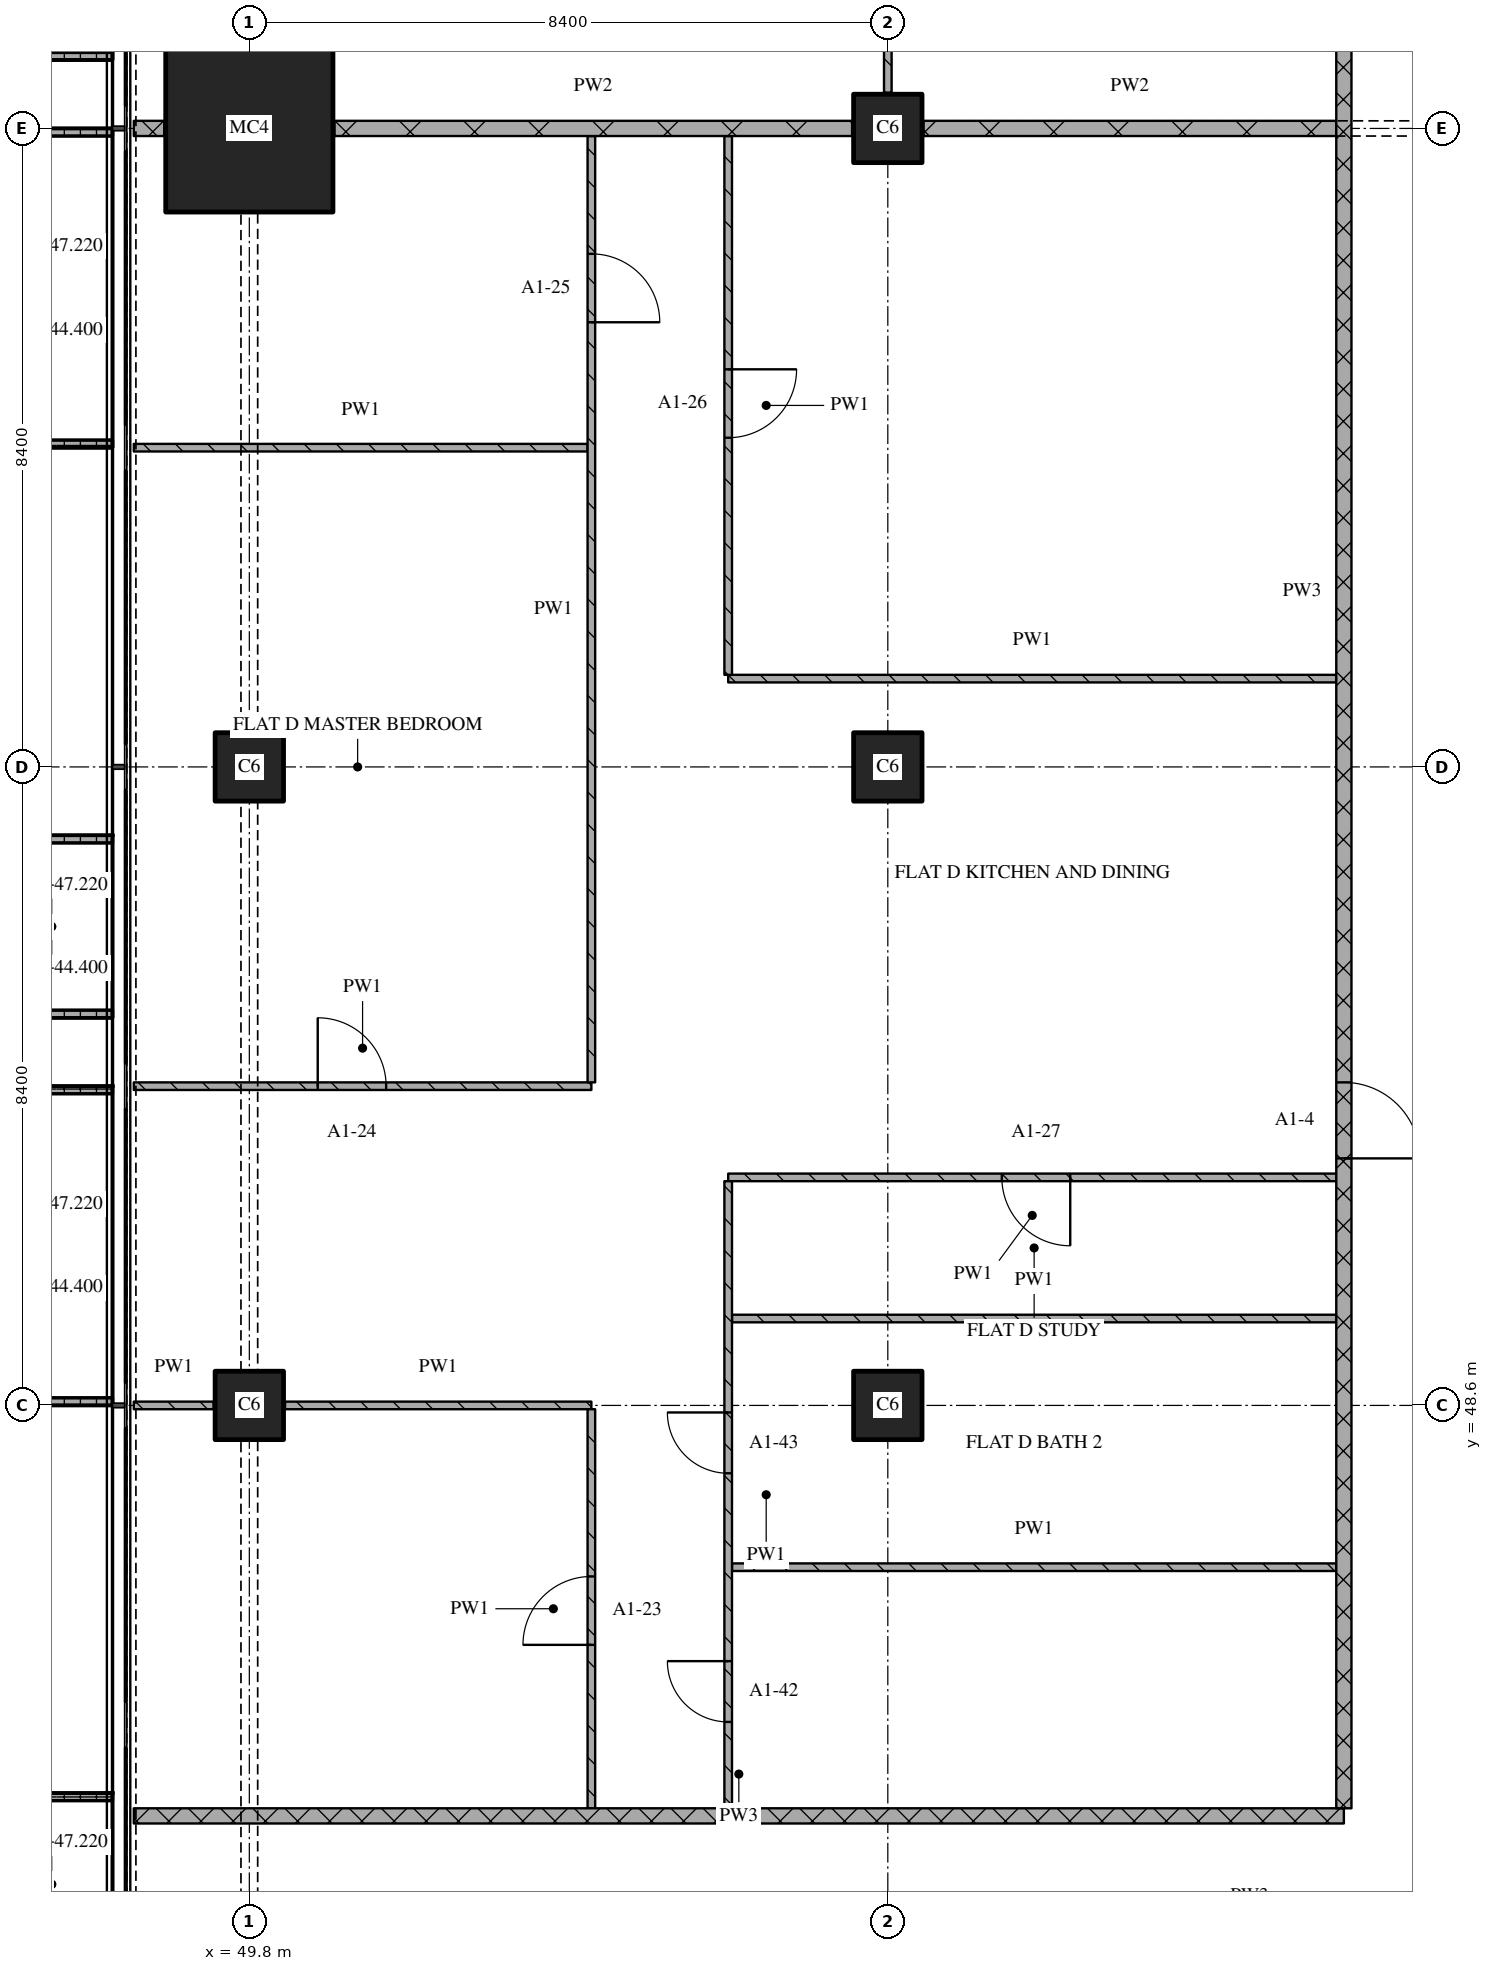
"""IFC4 building model, lengths in metres.
Left out: names, types, materials, properties, quantities, classifications, styles, units other than length and angle.
Written with IfcOpenShell. Run it as: python <this file> out.ifc"""

import sys

from ifc_helpers import new_model, si_unit, direction, frame, frame_2d, origin, origin_2d, place, context, subcontext, project, spatial, polyline, rectangle, outline, extrude, element, fill, save


model = new_model("IFC4")
c1 = context("Model", 3, precision=1e-05, world=origin(), true_north=direction((0.0, 1.0)))
c2 = subcontext(c1, "Body", "Model", "MODEL_VIEW")
j1 = project(units=[si_unit("LENGTHUNIT", "METRE"), si_unit("PLANEANGLEUNIT", "RADIAN")], contexts=[c1])
p1 = place(None, origin())
s1 = spatial("IfcSite", under=j1, at=p1, CompositionType="ELEMENT")
p2 = place(p1, origin())
s2 = spatial("IfcBuilding", under=s1, at=p2, CompositionType="ELEMENT")
p3 = place(p2, frame((0.0, 0.0, 44.4)))
s3 = spatial("IfcBuildingStorey", under=s2, at=p3, CompositionType="ELEMENT", Elevation=44.4)
for number, where, z_axis, x_axis in (
    (1, (49.8, 48.6, 0.0), (0.0, 0.0, 1.0), (1.0, 0.0, 0.0)),
    (2, (49.8, 57.0, 0.0), (0.0, 0.0, 1.0), (1.0, 0.0, 0.0)),
):
    element("IfcColumn", number, at=place(p3, frame(where, z_axis=z_axis, x_axis=x_axis)), inside=s3, PredefinedType="COLUMN", context=c2, shape_type="SweptSolid", body=[
        extrude(rectangle(XDim=0.9, YDim=0.9, at=origin_2d()), origin(), (0.0, 0.0, 1.0), 3.6),
    ])
p4 = place(p3, frame((49.8, 65.4, 0.0), z_axis=(0.0, 0.0, 1.0), x_axis=(1.0, 0.0, 0.0)))
e3 = element("IfcColumn", 3, at=p4, inside=s3, PredefinedType="COLUMN", context=c2, shape_type="SweptSolid", body=[
    extrude(rectangle(XDim=2.2, YDim=2.2, at=origin_2d()), origin(), (0.0, 0.0, 1.0), 3.6),
])
for number, where, z_axis, x_axis in (
    (4, (58.2, 48.6, 0.0), (0.0, 0.0, 1.0), (1.0, 0.0, 0.0)),
    (5, (58.2, 57.0, 0.0), (0.0, 0.0, 1.0), (1.0, 0.0, 0.0)),
    (6, (58.2, 65.4, 0.0), (0.0, 0.0, 1.0), (1.0, 0.0, 0.0)),
):
    element("IfcColumn", number, at=place(p3, frame(where, z_axis=z_axis, x_axis=x_axis)), inside=s3, PredefinedType="COLUMN", context=c2, shape_type="SweptSolid", body=[
        extrude(rectangle(XDim=0.9, YDim=0.9, at=origin_2d()), origin(), (0.0, 0.0, 1.0), 3.6),
    ])
p5 = place(p3, origin())
e7 = element("IfcWall", 7, at=p5, inside=s3, PredefinedType="SOLIDWALL", context=c2, shape_type="SweptSolid", body=[
    extrude(outline(polyline([(48.0, 68.7), (48.0, 68.6), (46.5, 68.6), (46.5, 66.4), (48.0, 66.4), (48.0, 66.3), (46.4, 66.3), (46.4, 68.7), (48.0, 68.7)])), origin(), (0.0, 0.0, 1.0), 1.0),
])
p6 = place(p3, origin())
e8 = element("IfcWall", 8, at=p6, inside=s3, PredefinedType="SOLIDWALL", context=c2, shape_type="SweptSolid", body=[
    extrude(outline(polyline([(48.0, 65.4), (48.0, 65.3), (46.367, 65.3), (46.367, 61.3), (48.0, 61.3), (48.0, 61.2), (46.267, 61.2), (46.267, 65.4), (48.0, 65.4)])), origin(), (0.0, 0.0, 1.0), 1.0),
])
p7 = place(p3, origin())
e9 = element("IfcWall", 9, at=p7, inside=s3, PredefinedType="SOLIDWALL", context=c2, shape_type="SweptSolid", body=[
    extrude(outline(polyline([(48.0, 56.1), (48.0, 56.0), (46.5, 56.0), (46.5, 53.8), (48.0, 53.8), (48.0, 53.7), (46.4, 53.7), (46.4, 56.1), (48.0, 56.1)])), origin(), (0.0, 0.0, 1.0), 1.0),
])
p8 = place(p3, origin())
e10 = element("IfcWall", 10, at=p8, inside=s3, PredefinedType="SOLIDWALL", context=c2, shape_type="SweptSolid", body=[
    extrude(outline(polyline([(48.0, 52.8), (48.0, 52.7), (46.367, 52.7), (46.367, 48.7), (48.0, 48.7), (48.0, 48.6), (46.267, 48.6), (46.267, 52.8), (48.0, 52.8)])), origin(), (0.0, 0.0, 1.0), 1.0),
])
p9 = place(p3, origin())
e11 = element("IfcWall", 11, at=p9, inside=s3, PredefinedType="SOLIDWALL", context=c2, shape_type="SweptSolid", body=[
    extrude(outline(polyline([(48.0, 43.5), (48.0, 43.4), (46.5, 43.4), (46.5, 41.2), (48.0, 41.2), (48.0, 41.1), (46.4, 41.1), (46.4, 43.5), (48.0, 43.5)])), origin(), (0.0, 0.0, 1.0), 1.0),
])
p10 = place(p3, frame((48.28, 43.2, 0.0), z_axis=(0.0, 0.0, 1.0), x_axis=(1.0, 0.0, 0.0)))
e12 = element("IfcWall", 12, at=p10, inside=s3, PredefinedType="PARTITIONING", context=c2, shape_type="SweptSolid", body=[
    extrude(rectangle(XDim=15.92, YDim=0.2, at=frame_2d((7.96, 0.0))), origin(), (0.0, 0.0, 1.0), 3.32),
])
p11 = place(p3, frame((56.15, 46.472, 0.0), z_axis=(0.0, 0.0, 1.0), x_axis=(1.0, 0.0, 0.0)))
e13 = element("IfcWall", 13, at=p11, inside=s3, PredefinedType="PARTITIONING", context=c2, shape_type="SweptSolid", body=[
    extrude(rectangle(XDim=7.95, YDim=0.1, at=frame_2d((3.975, 0.0))), origin(), (0.0, 0.0, 1.0), 3.32),
])
p12 = place(p3, frame((48.28, 48.6, 0.0), z_axis=(0.0, 0.0, 1.0), x_axis=(1.0, 0.0, 0.0)))
e14 = element("IfcWall", 14, at=p12, inside=s3, PredefinedType="PARTITIONING", context=c2, shape_type="SweptSolid", body=[
    extrude(rectangle(XDim=1.05, YDim=0.1, at=frame_2d((0.525, 0.0))), origin(), (0.0, 0.0, 1.0), 3.32),
])
p13 = place(p3, frame((50.27, 48.6, 0.0), z_axis=(0.0, 0.0, 1.0), x_axis=(1.0, 0.0, 0.0)))
e15 = element("IfcWall", 15, at=p13, inside=s3, PredefinedType="PARTITIONING", context=c2, shape_type="SweptSolid", body=[
    extrude(rectangle(XDim=4.03, YDim=0.1, at=frame_2d((2.015, 0.0))), origin(), (0.0, 0.0, 1.0), 3.32),
])
p14 = place(p3, frame((56.15, 49.743, 0.0), z_axis=(0.0, 0.0, 1.0), x_axis=(1.0, 0.0, 0.0)))
e16 = element("IfcWall", 16, at=p14, inside=s3, PredefinedType="PARTITIONING", context=c2, shape_type="SweptSolid", body=[
    extrude(rectangle(XDim=7.95, YDim=0.1, at=frame_2d((3.975, 0.0))), origin(), (0.0, 0.0, 1.0), 3.32),
])
p15 = place(p3, frame((64.1, 51.6, 0.0), z_axis=(0.0, 0.0, 1.0), x_axis=(-1.0, 0.0, 0.0)))
e17 = element("IfcWall", 17, at=p15, inside=s3, PredefinedType="PARTITIONING", context=c2, shape_type="SweptSolid", body=[
    extrude(rectangle(XDim=8.0, YDim=0.1, at=frame_2d((4.0, 0.0))), origin(), (0.0, 0.0, 1.0), 3.32),
])
p16 = place(p15, frame((3.5, 0.0, 0.0)))
e18 = element("IfcOpeningElement", 18, at=p16, cuts=e17, PredefinedType="OPENING", context=c2, shape_type="SweptSolid", body=[
    extrude(rectangle(XDim=0.9, YDim=2.1, at=frame_2d((0.45, 1.05))), frame((0.0, 0.06, 0.0), z_axis=(0.0, -1.0, 0.0), x_axis=(1.0, 0.0, 0.0)), (0.0, 0.0, 1.0), 0.12),
])
p17 = place(p3, frame((48.28, 52.8, 0.0), z_axis=(0.0, 0.0, 1.0), x_axis=(1.0, 0.0, 0.0)))
e19 = element("IfcWall", 19, at=p17, inside=s3, PredefinedType="PARTITIONING", context=c2, shape_type="SweptSolid", body=[
    extrude(rectangle(XDim=6.02, YDim=0.1, at=frame_2d((3.01, 0.0))), origin(), (0.0, 0.0, 1.0), 3.32),
])
p18 = place(p17, frame((2.42, 0.0, 0.0)))
e20 = element("IfcOpeningElement", 20, at=p18, cuts=e19, PredefinedType="OPENING", context=c2, shape_type="SweptSolid", body=[
    extrude(rectangle(XDim=0.9, YDim=2.1, at=frame_2d((0.45, 1.05))), frame((0.0, 0.06, 0.0), z_axis=(0.0, -1.0, 0.0), x_axis=(1.0, 0.0, 0.0)), (0.0, 0.0, 1.0), 0.12),
])
p19 = place(p3, frame((56.1, 58.162, 0.0), z_axis=(0.0, 0.0, 1.0), x_axis=(1.0, 0.0, 0.0)))
e21 = element("IfcWall", 21, at=p19, inside=s3, PredefinedType="PARTITIONING", context=c2, shape_type="SweptSolid", body=[
    extrude(rectangle(XDim=8.0, YDim=0.1, at=frame_2d((4.0, 0.0))), origin(), (0.0, 0.0, 1.0), 3.32),
])
p20 = place(p3, frame((48.28, 61.2, 0.0), z_axis=(0.0, 0.0, 1.0), x_axis=(1.0, 0.0, 0.0)))
e22 = element("IfcWall", 22, at=p20, inside=s3, PredefinedType="PARTITIONING", context=c2, shape_type="SweptSolid", body=[
    extrude(rectangle(XDim=5.97, YDim=0.1, at=frame_2d((2.985, 0.0))), origin(), (0.0, 0.0, 1.0), 3.32),
])
p21 = place(p3, frame((48.28, 65.4, 0.0), z_axis=(0.0, 0.0, 1.0), x_axis=(1.0, 0.0, 0.0)))
e23 = element("IfcWall", 23, at=p21, inside=s3, PredefinedType="PARTITIONING", context=c2, shape_type="SweptSolid", body=[
    extrude(rectangle(XDim=0.4, YDim=0.2, at=frame_2d((0.2, 0.0))), origin(), (0.0, 0.0, 1.0), 3.32),
])
p22 = place(p3, frame((50.92, 65.4, 0.0), z_axis=(0.0, 0.0, 1.0), x_axis=(1.0, 0.0, 0.0)))
e24 = element("IfcWall", 24, at=p22, inside=s3, PredefinedType="PARTITIONING", context=c2, shape_type="SweptSolid", body=[
    extrude(rectangle(XDim=6.81, YDim=0.2, at=frame_2d((3.405, 0.0))), origin(), (0.0, 0.0, 1.0), 3.32),
])
p23 = place(p3, frame((58.67, 65.4, 0.0), z_axis=(0.0, 0.0, 1.0), x_axis=(1.0, 0.0, 0.0)))
e25 = element("IfcWall", 25, at=p23, inside=s3, PredefinedType="PARTITIONING", context=c2, shape_type="SweptSolid", body=[
    extrude(rectangle(XDim=5.43, YDim=0.2, at=frame_2d((2.715, 0.0))), origin(), (0.0, 0.0, 1.0), 2.82),
])
p24 = place(p3, frame((54.3, 43.3, 0.0), z_axis=(0.0, 0.0, 1.0), x_axis=(0.0, 1.0, 0.0)))
e26 = element("IfcWall", 26, at=p24, inside=s3, PredefinedType="PARTITIONING", context=c2, shape_type="SweptSolid", body=[
    extrude(rectangle(XDim=5.25, YDim=0.1, at=frame_2d((2.625, 0.0))), origin(), (0.0, 0.0, 1.0), 3.32),
])
p25 = place(p24, frame((2.15, 0.0, 0.0)))
e27 = element("IfcOpeningElement", 27, at=p25, cuts=e26, PredefinedType="OPENING", context=c2, shape_type="SweptSolid", body=[
    extrude(rectangle(XDim=0.9, YDim=2.1, at=frame_2d((0.45, 1.05))), frame((0.0, 0.06, 0.0), z_axis=(0.0, -1.0, 0.0), x_axis=(1.0, 0.0, 0.0)), (0.0, 0.0, 1.0), 0.12),
])
p26 = place(p3, frame((54.3, 52.85, 0.0), z_axis=(0.0, 0.0, 1.0), x_axis=(0.0, 1.0, 0.0)))
e28 = element("IfcWall", 28, at=p26, inside=s3, PredefinedType="PARTITIONING", context=c2, shape_type="SweptSolid", body=[
    extrude(rectangle(XDim=12.45, YDim=0.1, at=frame_2d((6.225, 0.0))), origin(), (0.0, 0.0, 1.0), 3.32),
])
p27 = place(p26, frame((10.0, 0.0, 0.0)))
e29 = element("IfcOpeningElement", 29, at=p27, cuts=e28, PredefinedType="OPENING", context=c2, shape_type="SweptSolid", body=[
    extrude(rectangle(XDim=0.9, YDim=2.1, at=frame_2d((0.45, 1.05))), frame((0.0, 0.06, 0.0), z_axis=(0.0, -1.0, 0.0), x_axis=(1.0, 0.0, 0.0)), (0.0, 0.0, 1.0), 0.12),
])
p28 = place(p3, frame((56.1, 51.55, 0.0), z_axis=(0.0, 0.0, 1.0), x_axis=(0.0, -1.0, 0.0)))
e30 = element("IfcWall", 30, at=p28, inside=s3, PredefinedType="PARTITIONING", context=c2, shape_type="SweptSolid", body=[
    extrude(rectangle(XDim=8.25, YDim=0.1, at=frame_2d((4.125, 0.0))), origin(), (0.0, 0.0, 1.0), 3.32),
])
p29 = place(p28, frame((3.042, 0.0, 0.0)))
e31 = element("IfcOpeningElement", 31, at=p29, cuts=e30, PredefinedType="OPENING", context=c2, shape_type="SweptSolid", body=[
    extrude(rectangle(XDim=0.8, YDim=2.1, at=frame_2d((0.4, 1.05))), frame((0.0, 0.06, 0.0), z_axis=(0.0, -1.0, 0.0), x_axis=(1.0, 0.0, 0.0)), (0.0, 0.0, 1.0), 0.12),
])
p30 = place(p28, frame((6.314, 0.0, 0.0)))
e32 = element("IfcOpeningElement", 32, at=p30, cuts=e30, PredefinedType="OPENING", context=c2, shape_type="SweptSolid", body=[
    extrude(rectangle(XDim=0.8, YDim=2.1, at=frame_2d((0.4, 1.05))), frame((0.0, 0.06, 0.0), z_axis=(0.0, -1.0, 0.0), x_axis=(1.0, 0.0, 0.0)), (0.0, 0.0, 1.0), 0.12),
])
p31 = place(p3, frame((56.1, 65.3, 0.0), z_axis=(0.0, 0.0, 1.0), x_axis=(0.0, -1.0, 0.0)))
e33 = element("IfcWall", 33, at=p31, inside=s3, PredefinedType="PARTITIONING", context=c2, shape_type="SweptSolid", body=[
    extrude(rectangle(XDim=7.088, YDim=0.1, at=frame_2d((3.544, 0.0))), origin(), (0.0, 0.0, 1.0), 3.32),
])
p32 = place(p31, frame((3.069, 0.0, 0.0)))
e34 = element("IfcOpeningElement", 34, at=p32, cuts=e33, PredefinedType="OPENING", context=c2, shape_type="SweptSolid", body=[
    extrude(rectangle(XDim=0.9, YDim=2.1, at=frame_2d((0.45, 1.05))), frame((0.0, 0.06, 0.0), z_axis=(0.0, -1.0, 0.0), x_axis=(1.0, 0.0, 0.0)), (0.0, 0.0, 1.0), 0.12),
])
p33 = place(p3, frame((58.2, 68.95, 0.0), z_axis=(0.0, 0.0, 1.0), x_axis=(0.0, -1.0, 0.0)))
e35 = element("IfcWall", 35, at=p33, inside=s3, PredefinedType="PARTITIONING", context=c2, shape_type="SweptSolid", body=[
    extrude(rectangle(XDim=3.08, YDim=0.1, at=frame_2d((1.54, 0.0))), origin(), (0.0, 0.0, 1.0), 3.32),
])
p34 = place(p3, frame((64.2, 43.3, 0.0), z_axis=(0.0, 0.0, 1.0), x_axis=(0.0, 1.0, 0.0)))
e36 = element("IfcWall", 36, at=p34, inside=s3, PredefinedType="PARTITIONING", context=c2, shape_type="SweptSolid", body=[
    extrude(rectangle(XDim=32.02, YDim=0.2, at=frame_2d((16.01, 0.0))), origin(), (0.0, 0.0, 1.0), 3.32),
])
p35 = place(p34, frame((8.55, 0.0, 0.0)))
e37 = element("IfcOpeningElement", 37, at=p35, cuts=e36, PredefinedType="OPENING", context=c2, shape_type="SweptSolid", body=[
    extrude(rectangle(XDim=1.0, YDim=2.1, at=frame_2d((0.5, 1.05))), frame((0.0, 0.11, 0.0), z_axis=(0.0, -1.0, 0.0), x_axis=(1.0, 0.0, 0.0)), (0.0, 0.0, 1.0), 0.22),
])
p36 = place(p34, frame((25.95, 0.0, 0.0)))
e38 = element("IfcOpeningElement", 38, at=p36, cuts=e36, PredefinedType="OPENING", context=c2, shape_type="SweptSolid", body=[
    extrude(rectangle(XDim=1.0, YDim=2.1, at=frame_2d((0.5, 1.05))), frame((0.0, 0.11, 0.0), z_axis=(0.0, -1.0, 0.0), x_axis=(1.0, 0.0, 0.0)), (0.0, 0.0, 1.0), 0.22),
])
p37 = place(p16, origin())
e39 = element("IfcDoor", 39, at=p37, inside=s3, OperationType="SINGLE_SWING_LEFT", PredefinedType="DOOR", context=c2, shape_type="SweptSolid", body=[
    extrude(rectangle(XDim=0.9, YDim=2.1, at=frame_2d((0.45, 1.05))), frame((0.0, 0.025, 0.0), z_axis=(0.0, -1.0, 0.0), x_axis=(1.0, 0.0, 0.0)), (0.0, 0.0, 1.0), 0.05),
])
fill(e18, e39)
p38 = place(p18, origin())
e40 = element("IfcDoor", 40, at=p38, inside=s3, OperationType="SINGLE_SWING_LEFT", PredefinedType="DOOR", context=c2, shape_type="SweptSolid", body=[
    extrude(rectangle(XDim=0.9, YDim=2.1, at=frame_2d((0.45, 1.05))), frame((0.0, 0.025, 0.0), z_axis=(0.0, -1.0, 0.0), x_axis=(1.0, 0.0, 0.0)), (0.0, 0.0, 1.0), 0.05),
])
fill(e20, e40)
p39 = place(p25, origin())
e41 = element("IfcDoor", 41, at=p39, inside=s3, OperationType="SINGLE_SWING_LEFT", PredefinedType="DOOR", context=c2, shape_type="SweptSolid", body=[
    extrude(rectangle(XDim=0.9, YDim=2.1, at=frame_2d((0.45, 1.05))), frame((0.0, 0.025, 0.0), z_axis=(0.0, -1.0, 0.0), x_axis=(1.0, 0.0, 0.0)), (0.0, 0.0, 1.0), 0.05),
])
fill(e27, e41)
p40 = place(p27, origin())
e42 = element("IfcDoor", 42, at=p40, inside=s3, OperationType="SINGLE_SWING_RIGHT", PredefinedType="DOOR", context=c2, shape_type="SweptSolid", body=[
    extrude(rectangle(XDim=0.9, YDim=2.1, at=frame_2d((0.45, 1.05))), frame((0.0, 0.025, 0.0), z_axis=(0.0, -1.0, 0.0), x_axis=(1.0, 0.0, 0.0)), (0.0, 0.0, 1.0), 0.05),
])
fill(e29, e42)
p41 = place(p29, origin())
e43 = element("IfcDoor", 43, at=p41, inside=s3, OperationType="SINGLE_SWING_RIGHT", PredefinedType="DOOR", context=c2, shape_type="SweptSolid", body=[
    extrude(rectangle(XDim=0.8, YDim=2.1, at=frame_2d((0.4, 1.05))), frame((0.0, 0.025, 0.0), z_axis=(0.0, -1.0, 0.0), x_axis=(1.0, 0.0, 0.0)), (0.0, 0.0, 1.0), 0.05),
])
fill(e31, e43)
p42 = place(p30, origin())
e44 = element("IfcDoor", 44, at=p42, inside=s3, OperationType="SINGLE_SWING_RIGHT", PredefinedType="DOOR", context=c2, shape_type="SweptSolid", body=[
    extrude(rectangle(XDim=0.8, YDim=2.1, at=frame_2d((0.4, 1.05))), frame((0.0, 0.025, 0.0), z_axis=(0.0, -1.0, 0.0), x_axis=(1.0, 0.0, 0.0)), (0.0, 0.0, 1.0), 0.05),
])
fill(e32, e44)
p43 = place(p32, origin())
e45 = element("IfcDoor", 45, at=p43, inside=s3, OperationType="SINGLE_SWING_LEFT", PredefinedType="DOOR", context=c2, shape_type="SweptSolid", body=[
    extrude(rectangle(XDim=0.9, YDim=2.1, at=frame_2d((0.45, 1.05))), frame((0.0, 0.025, 0.0), z_axis=(0.0, -1.0, 0.0), x_axis=(1.0, 0.0, 0.0)), (0.0, 0.0, 1.0), 0.05),
])
fill(e34, e45)
p44 = place(p35, origin())
e46 = element("IfcDoor", 46, at=p44, inside=s3, OperationType="SINGLE_SWING_RIGHT", PredefinedType="DOOR", context=c2, shape_type="SweptSolid", body=[
    extrude(rectangle(XDim=1.0, YDim=2.1, at=frame_2d((0.5, 1.05))), frame((0.0, 0.025, 0.0), z_axis=(0.0, -1.0, 0.0), x_axis=(1.0, 0.0, 0.0)), (0.0, 0.0, 1.0), 0.05),
])
fill(e37, e46)
save(model, sys.argv[1])
